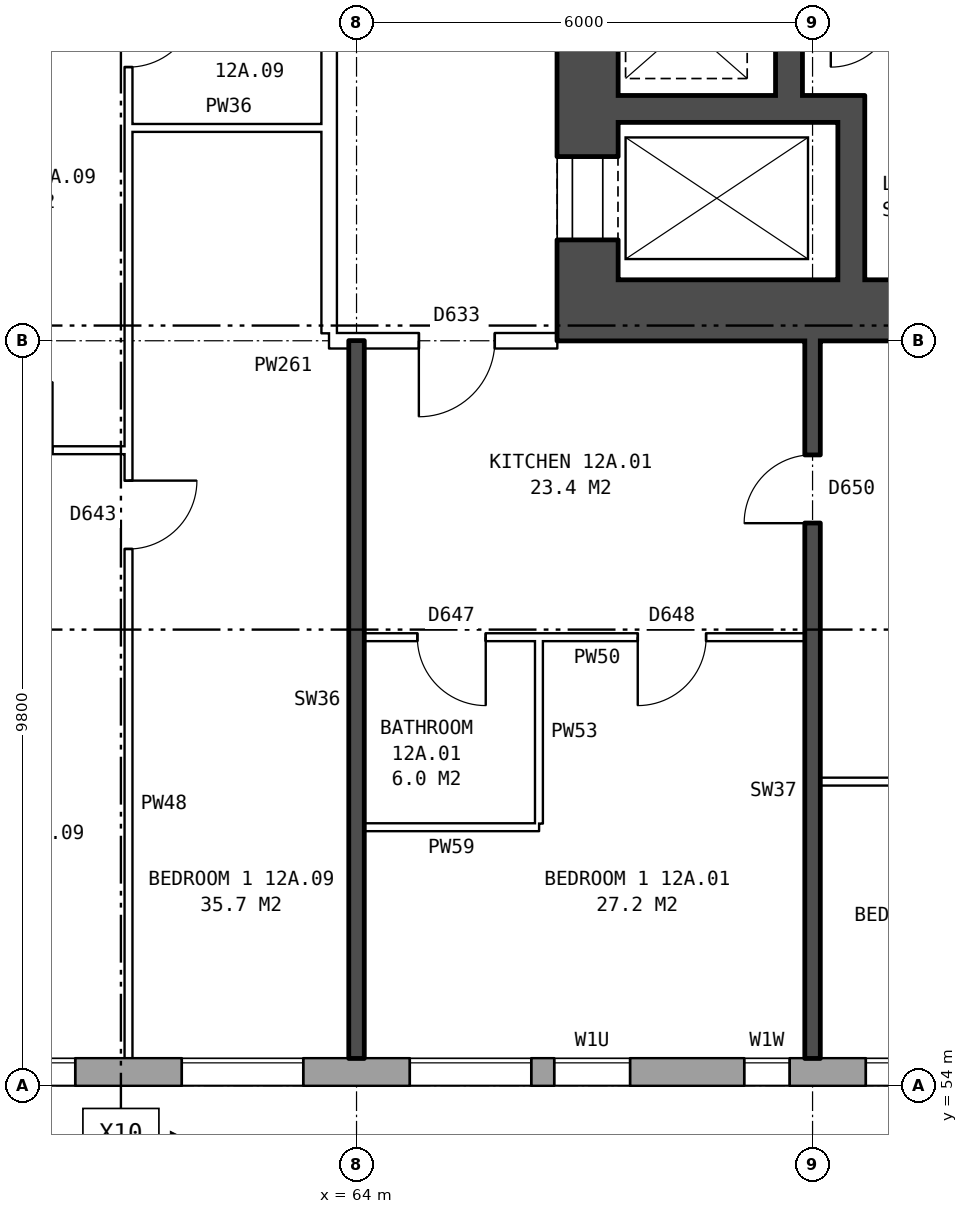
"""IFC4 building model, lengths in metres.
Left out: names, types, materials, properties, quantities, classifications, styles, units other than length and angle.
Written with IfcOpenShell. Run it as: python <this file> out.ifc"""

import sys

from ifc_helpers import new_model, si_unit, direction, frame, frame_2d, origin, place, context, subcontext, project, spatial, rectangle, extrude, element, fill, save


model = new_model("IFC4")
c1 = context("Model", 3, precision=1e-05, world=origin(), true_north=direction((0.0, 1.0)))
c2 = subcontext(c1, "Body", "Model", "MODEL_VIEW")
j1 = project(units=[si_unit("LENGTHUNIT", "METRE"), si_unit("PLANEANGLEUNIT", "RADIAN")], contexts=[c1])
p1 = place(None, origin())
s1 = spatial("IfcSite", under=j1, at=p1, CompositionType="ELEMENT")
p2 = place(p1, origin())
s2 = spatial("IfcBuilding", under=s1, at=p2, CompositionType="ELEMENT")
p3 = place(p2, frame((0.0, 0.0, 47.4)))
s3 = spatial("IfcBuildingStorey", under=s2, at=p3, CompositionType="ELEMENT", Elevation=47.4)
p4 = place(p3, frame((24.575, 54.18, 0.0), z_axis=(0.0, 0.0, 1.0), x_axis=(1.0, 0.0, 0.0)))
e1 = element("IfcWall", 1, at=p4, inside=s3, PredefinedType="STANDARD", context=c2, shape_type="SweptSolid", body=[
    extrude(rectangle(XDim=48.351, YDim=0.36, at=frame_2d((24.175, 0.0))), origin(), (0.0, 0.0, 1.0), 2.85),
])
p5 = place(p4, frame((1.125, 0.0, 0.8)))
e2 = element("IfcOpeningElement", 2, at=p5, cuts=e1, PredefinedType="OPENING", context=c2, shape_type="SweptSolid", body=[
    extrude(rectangle(XDim=1.6, YDim=1.8, at=frame_2d((0.8, 0.9))), frame((0.0, 0.19, 0.0), z_axis=(0.0, -1.0, 0.0), x_axis=(1.0, 0.0, 0.0)), (0.0, 0.0, 1.0), 0.38),
])
p6 = place(p4, frame((5.625, 0.0, 0.8)))
e3 = element("IfcOpeningElement", 3, at=p6, cuts=e1, PredefinedType="OPENING", context=c2, shape_type="SweptSolid", body=[
    extrude(rectangle(XDim=1.2, YDim=1.2, at=frame_2d((0.6, 0.6))), frame((0.0, 0.19, 0.0), z_axis=(0.0, -1.0, 0.0), x_axis=(1.0, 0.0, 0.0)), (0.0, 0.0, 1.0), 0.38),
])
p7 = place(p4, frame((7.125, 0.0, 0.8)))
e4 = element("IfcOpeningElement", 4, at=p7, cuts=e1, PredefinedType="OPENING", context=c2, shape_type="SweptSolid", body=[
    extrude(rectangle(XDim=1.6, YDim=1.8, at=frame_2d((0.8, 0.9))), frame((0.0, 0.19, 0.0), z_axis=(0.0, -1.0, 0.0), x_axis=(1.0, 0.0, 0.0)), (0.0, 0.0, 1.0), 0.38),
])
p8 = place(p4, frame((10.125, 0.0, 0.8)))
e5 = element("IfcOpeningElement", 5, at=p8, cuts=e1, PredefinedType="OPENING", context=c2, shape_type="SweptSolid", body=[
    extrude(rectangle(XDim=1.6, YDim=1.8, at=frame_2d((0.8, 0.9))), frame((0.0, 0.19, 0.0), z_axis=(0.0, -1.0, 0.0), x_axis=(1.0, 0.0, 0.0)), (0.0, 0.0, 1.0), 0.38),
])
p9 = place(p4, frame((13.125, 0.0, 0.8)))
e6 = element("IfcOpeningElement", 6, at=p9, cuts=e1, PredefinedType="OPENING", context=c2, shape_type="SweptSolid", body=[
    extrude(rectangle(XDim=1.6, YDim=1.8, at=frame_2d((0.8, 0.9))), frame((0.0, 0.19, 0.0), z_axis=(0.0, -1.0, 0.0), x_axis=(1.0, 0.0, 0.0)), (0.0, 0.0, 1.0), 0.38),
])
p10 = place(p4, frame((16.125, 0.0, 0.8)))
e7 = element("IfcOpeningElement", 7, at=p10, cuts=e1, PredefinedType="OPENING", context=c2, shape_type="SweptSolid", body=[
    extrude(rectangle(XDim=1.6, YDim=1.8, at=frame_2d((0.8, 0.9))), frame((0.0, 0.19, 0.0), z_axis=(0.0, -1.0, 0.0), x_axis=(1.0, 0.0, 0.0)), (0.0, 0.0, 1.0), 0.38),
])
p11 = place(p4, frame((19.125, 0.0, 0.8)))
e8 = element("IfcOpeningElement", 8, at=p11, cuts=e1, PredefinedType="OPENING", context=c2, shape_type="SweptSolid", body=[
    extrude(rectangle(XDim=1.6, YDim=1.8, at=frame_2d((0.8, 0.9))), frame((0.0, 0.19, 0.0), z_axis=(0.0, -1.0, 0.0), x_axis=(1.0, 0.0, 0.0)), (0.0, 0.0, 1.0), 0.38),
])
p12 = place(p4, frame((22.125, 0.0, 0.8)))
e9 = element("IfcOpeningElement", 9, at=p12, cuts=e1, PredefinedType="OPENING", context=c2, shape_type="SweptSolid", body=[
    extrude(rectangle(XDim=1.6, YDim=1.8, at=frame_2d((0.8, 0.9))), frame((0.0, 0.19, 0.0), z_axis=(0.0, -1.0, 0.0), x_axis=(1.0, 0.0, 0.0)), (0.0, 0.0, 1.0), 0.38),
])
p13 = place(p4, frame((25.125, 0.0, 0.8)))
e10 = element("IfcOpeningElement", 10, at=p13, cuts=e1, PredefinedType="OPENING", context=c2, shape_type="SweptSolid", body=[
    extrude(rectangle(XDim=1.6, YDim=1.8, at=frame_2d((0.8, 0.9))), frame((0.0, 0.19, 0.0), z_axis=(0.0, -1.0, 0.0), x_axis=(1.0, 0.0, 0.0)), (0.0, 0.0, 1.0), 0.38),
])
p14 = place(p4, frame((28.125, 0.0, 0.8)))
e11 = element("IfcOpeningElement", 11, at=p14, cuts=e1, PredefinedType="OPENING", context=c2, shape_type="SweptSolid", body=[
    extrude(rectangle(XDim=1.6, YDim=1.8, at=frame_2d((0.8, 0.9))), frame((0.0, 0.19, 0.0), z_axis=(0.0, -1.0, 0.0), x_axis=(1.0, 0.0, 0.0)), (0.0, 0.0, 1.0), 0.38),
])
p15 = place(p4, frame((31.125, 0.0, 0.8)))
e12 = element("IfcOpeningElement", 12, at=p15, cuts=e1, PredefinedType="OPENING", context=c2, shape_type="SweptSolid", body=[
    extrude(rectangle(XDim=1.6, YDim=1.8, at=frame_2d((0.8, 0.9))), frame((0.0, 0.19, 0.0), z_axis=(0.0, -1.0, 0.0), x_axis=(1.0, 0.0, 0.0)), (0.0, 0.0, 1.0), 0.38),
])
p16 = place(p4, frame((34.125, 0.0, 0.8)))
e13 = element("IfcOpeningElement", 13, at=p16, cuts=e1, PredefinedType="OPENING", context=c2, shape_type="SweptSolid", body=[
    extrude(rectangle(XDim=1.6, YDim=1.8, at=frame_2d((0.8, 0.9))), frame((0.0, 0.19, 0.0), z_axis=(0.0, -1.0, 0.0), x_axis=(1.0, 0.0, 0.0)), (0.0, 0.0, 1.0), 0.38),
])
p17 = place(p4, frame((37.125, 0.0, 0.8)))
e14 = element("IfcOpeningElement", 14, at=p17, cuts=e1, PredefinedType="OPENING", context=c2, shape_type="SweptSolid", body=[
    extrude(rectangle(XDim=1.6, YDim=1.8, at=frame_2d((0.8, 0.9))), frame((0.0, 0.19, 0.0), z_axis=(0.0, -1.0, 0.0), x_axis=(1.0, 0.0, 0.0)), (0.0, 0.0, 1.0), 0.38),
])
p18 = place(p4, frame((40.125, 0.0, 0.8)))
e15 = element("IfcOpeningElement", 15, at=p18, cuts=e1, PredefinedType="OPENING", context=c2, shape_type="SweptSolid", body=[
    extrude(rectangle(XDim=1.6, YDim=1.8, at=frame_2d((0.8, 0.9))), frame((0.0, 0.19, 0.0), z_axis=(0.0, -1.0, 0.0), x_axis=(1.0, 0.0, 0.0)), (0.0, 0.0, 1.0), 0.38),
])
p19 = place(p4, frame((42.025, 0.0, 0.8)))
e16 = element("IfcOpeningElement", 16, at=p19, cuts=e1, PredefinedType="OPENING", context=c2, shape_type="SweptSolid", body=[
    extrude(rectangle(XDim=1.0, YDim=0.9, at=frame_2d((0.5, 0.45))), frame((0.0, 0.19, 0.0), z_axis=(0.0, -1.0, 0.0), x_axis=(1.0, 0.0, 0.0)), (0.0, 0.0, 1.0), 0.38),
])
p20 = place(p4, frame((46.125, 0.0, 0.8)))
e17 = element("IfcOpeningElement", 17, at=p20, cuts=e1, PredefinedType="OPENING", context=c2, shape_type="SweptSolid", body=[
    extrude(rectangle(XDim=1.6, YDim=1.8, at=frame_2d((0.8, 0.9))), frame((0.0, 0.19, 0.0), z_axis=(0.0, -1.0, 0.0), x_axis=(1.0, 0.0, 0.0)), (0.0, 0.0, 1.0), 0.38),
])
p21 = place(p4, frame((44.525, 0.0, 1.7)))
e18 = element("IfcOpeningElement", 18, at=p21, cuts=e1, PredefinedType="OPENING", context=c2, shape_type="SweptSolid", body=[
    extrude(rectangle(XDim=0.6, YDim=0.9, at=frame_2d((0.3, 0.45))), frame((0.0, 0.19, 0.0), z_axis=(0.0, -1.0, 0.0), x_axis=(1.0, 0.0, 0.0)), (0.0, 0.0, 1.0), 0.38),
])
p22 = place(p3, frame((67.04, 64.6, 0.0), z_axis=(0.0, 0.0, 1.0), x_axis=(0.0, 1.0, 0.0)))
e19 = element("IfcWall", 19, at=p22, inside=s3, PredefinedType="SHEAR", context=c2, shape_type="SweptSolid", body=[
    extrude(rectangle(XDim=10.8, YDim=0.8, at=frame_2d((5.4, 0.0))), origin(), (0.0, 0.0, 1.0), 2.85),
])
p23 = place(p22, frame((0.525, 0.0, 0.0)))
e20 = element("IfcOpeningElement", 20, at=p23, cuts=e19, PredefinedType="OPENING", context=c2, shape_type="SweptSolid", body=[
    extrude(rectangle(XDim=1.1, YDim=2.1, at=frame_2d((0.55, 1.05))), frame((0.0, 0.41, 0.0), z_axis=(0.0, -1.0, 0.0), x_axis=(1.0, 0.0, 0.0)), (0.0, 0.0, 1.0), 0.82),
])
p24 = place(p22, frame((9.1, 0.0, 0.0)))
e21 = element("IfcOpeningElement", 21, at=p24, cuts=e19, PredefinedType="OPENING", context=c2, shape_type="SweptSolid", body=[
    extrude(rectangle(XDim=1.1, YDim=2.1, at=frame_2d((0.55, 1.05))), frame((0.0, 0.41, 0.0), z_axis=(0.0, -1.0, 0.0), x_axis=(1.0, 0.0, 0.0)), (0.0, 0.0, 1.0), 0.82),
])
p25 = place(p3, frame((66.64, 64.2, 0.0), z_axis=(0.0, 0.0, 1.0), x_axis=(1.0, 0.0, 0.0)))
e22 = element("IfcWall", 22, at=p25, inside=s3, PredefinedType="SHEAR", context=c2, shape_type="SweptSolid", body=[
    extrude(rectangle(XDim=9.0, YDim=0.8, at=frame_2d((4.5, 0.0))), origin(), (0.0, 0.0, 1.0), 2.85),
])
p26 = place(p3, frame((67.44, 66.85, 0.0), z_axis=(0.0, 0.0, 1.0), x_axis=(1.0, 0.0, 0.0)))
e23 = element("IfcWall", 23, at=p26, inside=s3, PredefinedType="SHEAR", context=c2, shape_type="SweptSolid", body=[
    extrude(rectangle(XDim=3.245, YDim=0.35, at=frame_2d((1.623, 0.0))), origin(), (0.0, 0.0, 1.0), 2.85),
])
p27 = place(p3, frame((69.69, 67.025, 0.0), z_axis=(0.0, 0.0, 1.0), x_axis=(0.0, 1.0, 0.0)))
e24 = element("IfcWall", 24, at=p27, inside=s3, PredefinedType="SHEAR", context=c2, shape_type="SweptSolid", body=[
    extrude(rectangle(XDim=6.6, YDim=0.35, at=frame_2d((3.3, 0.0))), origin(), (0.0, 0.0, 1.0), 2.85),
])
p28 = place(p3, frame((70.51, 64.6, 0.0), z_axis=(0.0, 0.0, 1.0), x_axis=(0.0, 1.0, 0.0)))
e25 = element("IfcWall", 25, at=p28, inside=s3, PredefinedType="SHEAR", context=c2, shape_type="SweptSolid", body=[
    extrude(rectangle(XDim=2.075, YDim=0.35, at=frame_2d((1.038, 0.0))), origin(), (0.0, 0.0, 1.0), 2.85),
])
p29 = place(p3, frame((63.64, 63.9, 0.0), z_axis=(0.0, 0.0, 1.0), x_axis=(0.0, 1.0, 0.0)))
e26 = element("IfcWall", 26, at=p29, inside=s3, PredefinedType="PARTITIONING", context=c2, shape_type="SweptSolid", body=[
    extrude(rectangle(XDim=12.2, YDim=0.2, at=frame_2d((6.1, 0.0))), origin(), (0.0, 0.0, 1.0), 2.85),
])
p30 = place(p29, frame((5.1, 0.0, 0.0)))
e27 = element("IfcOpeningElement", 27, at=p30, cuts=e26, PredefinedType="OPENING", context=c2, shape_type="SweptSolid", body=[
    extrude(rectangle(XDim=2.0, YDim=2.1, at=frame_2d((1.0, 1.05))), frame((0.0, 0.11, 0.0), z_axis=(0.0, -1.0, 0.0), x_axis=(1.0, 0.0, 0.0)), (0.0, 0.0, 1.0), 0.22),
])
p31 = place(p3, frame((64.1, 57.4, 0.0), z_axis=(0.0, 0.0, 1.0), x_axis=(1.0, 0.0, 0.0)))
e28 = element("IfcWall", 28, at=p31, inside=s3, PredefinedType="PARTITIONING", context=c2, shape_type="SweptSolid", body=[
    extrude(rectangle(XDim=2.3, YDim=0.1, at=frame_2d((1.15, 0.0))), origin(), (0.0, 0.0, 1.0), 2.85),
])
p32 = place(p3, frame((70.1, 58.0, 0.0), z_axis=(0.0, 0.0, 1.0), x_axis=(1.0, 0.0, 0.0)))
e29 = element("IfcWall", 29, at=p32, inside=s3, PredefinedType="PARTITIONING", context=c2, shape_type="SweptSolid", body=[
    extrude(rectangle(XDim=5.54, YDim=0.1, at=frame_2d((2.77, 0.0))), origin(), (0.0, 0.0, 1.0), 2.85),
])
p33 = place(p32, frame((2.32, 0.0, 0.0)))
e30 = element("IfcOpeningElement", 30, at=p33, cuts=e29, PredefinedType="OPENING", context=c2, shape_type="SweptSolid", body=[
    extrude(rectangle(XDim=0.9, YDim=2.1, at=frame_2d((0.45, 1.05))), frame((0.0, 0.06, 0.0), z_axis=(0.0, -1.0, 0.0), x_axis=(1.0, 0.0, 0.0)), (0.0, 0.0, 1.0), 0.12),
])
p34 = place(p3, frame((64.1, 59.9, 0.0), z_axis=(0.0, 0.0, 1.0), x_axis=(1.0, 0.0, 0.0)))
e31 = element("IfcWall", 31, at=p34, inside=s3, PredefinedType="PARTITIONING", context=c2, shape_type="SweptSolid", body=[
    extrude(rectangle(XDim=5.8, YDim=0.1, at=frame_2d((2.9, 0.0))), origin(), (0.0, 0.0, 1.0), 2.85),
])
p35 = place(p34, frame((3.6, 0.0, 0.0)))
e32 = element("IfcOpeningElement", 32, at=p35, cuts=e31, PredefinedType="OPENING", context=c2, shape_type="SweptSolid", body=[
    extrude(rectangle(XDim=0.9, YDim=2.1, at=frame_2d((0.45, 1.05))), frame((0.0, 0.06, 0.0), z_axis=(0.0, -1.0, 0.0), x_axis=(1.0, 0.0, 0.0)), (0.0, 0.0, 1.0), 0.12),
])
p36 = place(p34, frame((0.7, 0.0, 0.0)))
e33 = element("IfcOpeningElement", 33, at=p36, cuts=e31, PredefinedType="OPENING", context=c2, shape_type="SweptSolid", body=[
    extrude(rectangle(XDim=0.9, YDim=2.1, at=frame_2d((0.45, 1.05))), frame((0.0, 0.06, 0.0), z_axis=(0.0, -1.0, 0.0), x_axis=(1.0, 0.0, 0.0)), (0.0, 0.0, 1.0), 0.12),
])
p37 = place(p3, frame((58.1, 62.36, 0.0), z_axis=(0.0, 0.0, 1.0), x_axis=(1.0, 0.0, 0.0)))
e34 = element("IfcWall", 34, at=p37, inside=s3, PredefinedType="PARTITIONING", context=c2, shape_type="SweptSolid", body=[
    extrude(rectangle(XDim=2.9, YDim=0.1, at=frame_2d((1.45, 0.0))), origin(), (0.0, 0.0, 1.0), 2.85),
])
p38 = place(p37, frame((1.0, 0.0, 0.0)))
e35 = element("IfcOpeningElement", 35, at=p38, cuts=e34, PredefinedType="OPENING", context=c2, shape_type="SweptSolid", body=[
    extrude(rectangle(XDim=0.9, YDim=2.1, at=frame_2d((0.45, 1.05))), frame((0.0, 0.06, 0.0), z_axis=(0.0, -1.0, 0.0), x_axis=(1.0, 0.0, 0.0)), (0.0, 0.0, 1.0), 0.12),
])
p39 = place(p3, frame((63.64, 63.8, 0.0), z_axis=(0.0, 0.0, 1.0), x_axis=(1.0, 0.0, 0.0)))
e36 = element("IfcWall", 36, at=p39, inside=s3, PredefinedType="PARTITIONING", context=c2, shape_type="SweptSolid", body=[
    extrude(rectangle(XDim=3.0, YDim=0.2, at=frame_2d((1.5, 0.0))), origin(), (0.0, 0.0, 1.0), 2.85),
])
p40 = place(p39, frame((1.18, 0.0, 0.0)))
e37 = element("IfcOpeningElement", 37, at=p40, cuts=e36, PredefinedType="OPENING", context=c2, shape_type="SweptSolid", body=[
    extrude(rectangle(XDim=1.0, YDim=2.1, at=frame_2d((0.5, 1.05))), frame((0.0, 0.11, 0.0), z_axis=(0.0, -1.0, 0.0), x_axis=(1.0, 0.0, 0.0)), (0.0, 0.0, 1.0), 0.22),
])
p41 = place(p3, frame((61.0, 66.6, 0.0), z_axis=(0.0, 0.0, 1.0), x_axis=(1.0, 0.0, 0.0)))
e38 = element("IfcWall", 38, at=p41, inside=s3, PredefinedType="PARTITIONING", context=c2, shape_type="SweptSolid", body=[
    extrude(rectangle(XDim=2.64, YDim=0.1, at=frame_2d((1.32, 0.0))), origin(), (0.0, 0.0, 1.0), 2.85),
])
p42 = place(p3, frame((61.0, 54.36, 0.0), z_axis=(0.0, 0.0, 1.0), x_axis=(0.0, 1.0, 0.0)))
e39 = element("IfcWall", 39, at=p42, inside=s3, PredefinedType="PARTITIONING", context=c2, shape_type="SweptSolid", body=[
    extrude(rectangle(XDim=14.34, YDim=0.1, at=frame_2d((7.17, 0.0))), origin(), (0.0, 0.0, 1.0), 2.85),
])
p43 = place(p42, frame((6.7, 0.0, 0.0)))
e40 = element("IfcOpeningElement", 40, at=p43, cuts=e39, PredefinedType="OPENING", context=c2, shape_type="SweptSolid", body=[
    extrude(rectangle(XDim=0.9, YDim=2.1, at=frame_2d((0.45, 1.05))), frame((0.0, 0.06, 0.0), z_axis=(0.0, -1.0, 0.0), x_axis=(1.0, 0.0, 0.0)), (0.0, 0.0, 1.0), 0.12),
])
p44 = place(p42, frame((13.04, 0.0, 0.0)))
e41 = element("IfcOpeningElement", 41, at=p44, cuts=e39, PredefinedType="OPENING", context=c2, shape_type="SweptSolid", body=[
    extrude(rectangle(XDim=0.9, YDim=2.1, at=frame_2d((0.45, 1.05))), frame((0.0, 0.06, 0.0), z_axis=(0.0, -1.0, 0.0), x_axis=(1.0, 0.0, 0.0)), (0.0, 0.0, 1.0), 0.12),
])
p45 = place(p3, frame((64.0, 54.36, 0.0), z_axis=(0.0, 0.0, 1.0), x_axis=(0.0, 1.0, 0.0)))
e42 = element("IfcWall", 42, at=p45, inside=s3, PredefinedType="SOLIDWALL", context=c2, shape_type="SweptSolid", body=[
    extrude(rectangle(XDim=9.44, YDim=0.2, at=frame_2d((4.72, 0.0))), origin(), (0.0, 0.0, 1.0), 2.85),
])
p46 = place(p3, frame((66.4, 57.45, 0.0), z_axis=(0.0, 0.0, 1.0), x_axis=(0.0, 1.0, 0.0)))
e43 = element("IfcWall", 43, at=p46, inside=s3, PredefinedType="PARTITIONING", context=c2, shape_type="SweptSolid", body=[
    extrude(rectangle(XDim=2.4, YDim=0.1, at=frame_2d((1.2, 0.0))), origin(), (0.0, 0.0, 1.0), 2.85),
])
p47 = place(p3, frame((70.0, 54.36, 0.0), z_axis=(0.0, 0.0, 1.0), x_axis=(0.0, 1.0, 0.0)))
e44 = element("IfcWall", 44, at=p47, inside=s3, PredefinedType="SOLIDWALL", context=c2, shape_type="SweptSolid", body=[
    extrude(rectangle(XDim=9.44, YDim=0.2, at=frame_2d((4.72, 0.0))), origin(), (0.0, 0.0, 1.0), 2.85),
])
p48 = place(p47, frame((7.04, 0.0, 0.0)))
e45 = element("IfcOpeningElement", 45, at=p48, cuts=e44, PredefinedType="OPENING", context=c2, shape_type="SweptSolid", body=[
    extrude(rectangle(XDim=0.9, YDim=2.1, at=frame_2d((0.45, 1.05))), frame((0.0, 0.11, 0.0), z_axis=(0.0, -1.0, 0.0), x_axis=(1.0, 0.0, 0.0)), (0.0, 0.0, 1.0), 0.22),
])
p49 = place(p16, origin())
e46 = element("IfcWindow", 46, at=p49, inside=s3, PartitioningType="SINGLE_PANEL", PredefinedType="WINDOW", context=c2, shape_type="SweptSolid", body=[
    extrude(rectangle(XDim=1.6, YDim=1.8, at=frame_2d((0.8, 0.9))), frame((0.0, 0.15, 0.0), z_axis=(0.0, -1.0, 0.0), x_axis=(1.0, 0.0, 0.0)), (0.0, 0.0, 1.0), 0.06),
])
fill(e13, e46)
p50 = place(p17, origin())
e47 = element("IfcWindow", 47, at=p50, inside=s3, PartitioningType="SINGLE_PANEL", PredefinedType="WINDOW", context=c2, shape_type="SweptSolid", body=[
    extrude(rectangle(XDim=1.6, YDim=1.8, at=frame_2d((0.8, 0.9))), frame((0.0, 0.15, 0.0), z_axis=(0.0, -1.0, 0.0), x_axis=(1.0, 0.0, 0.0)), (0.0, 0.0, 1.0), 0.06),
])
fill(e14, e47)
p51 = place(p18, origin())
e48 = element("IfcWindow", 48, at=p51, inside=s3, PartitioningType="SINGLE_PANEL", PredefinedType="WINDOW", context=c2, shape_type="SweptSolid", body=[
    extrude(rectangle(XDim=1.6, YDim=1.8, at=frame_2d((0.8, 0.9))), frame((0.0, 0.15, 0.0), z_axis=(0.0, -1.0, 0.0), x_axis=(1.0, 0.0, 0.0)), (0.0, 0.0, 1.0), 0.06),
])
fill(e15, e48)
p52 = place(p19, origin())
e49 = element("IfcWindow", 49, at=p52, inside=s3, PartitioningType="SINGLE_PANEL", PredefinedType="WINDOW", context=c2, shape_type="SweptSolid", body=[
    extrude(rectangle(XDim=1.0, YDim=0.9, at=frame_2d((0.5, 0.45))), frame((0.0, 0.15, 0.0), z_axis=(0.0, -1.0, 0.0), x_axis=(1.0, 0.0, 0.0)), (0.0, 0.0, 1.0), 0.06),
])
fill(e16, e49)
p53 = place(p20, origin())
e50 = element("IfcWindow", 50, at=p53, inside=s3, PartitioningType="SINGLE_PANEL", PredefinedType="WINDOW", context=c2, shape_type="SweptSolid", body=[
    extrude(rectangle(XDim=1.6, YDim=1.8, at=frame_2d((0.8, 0.9))), frame((0.0, 0.15, 0.0), z_axis=(0.0, -1.0, 0.0), x_axis=(1.0, 0.0, 0.0)), (0.0, 0.0, 1.0), 0.06),
])
fill(e17, e50)
p54 = place(p23, origin())
e51 = element("IfcDoor", 51, at=p54, inside=s3, OperationType="DOUBLE_DOOR_SLIDING", PredefinedType="DOOR", context=c2, shape_type="SweptSolid", body=[
    extrude(rectangle(XDim=1.1, YDim=2.1, at=frame_2d((0.55, 1.05))), frame((0.0, -0.335, 0.0), z_axis=(0.0, -1.0, 0.0), x_axis=(1.0, 0.0, 0.0)), (0.0, 0.0, 1.0), 0.05),
])
fill(e20, e51)
p55 = place(p35, frame((0.9, 0.0, 0.0), z_axis=(0.0, 0.0, 1.0), x_axis=(-1.0, 0.0, 0.0)))
e52 = element("IfcDoor", 52, at=p55, inside=s3, OperationType="SINGLE_SWING_RIGHT", PredefinedType="DOOR", context=c2, shape_type="SweptSolid", body=[
    extrude(rectangle(XDim=0.9, YDim=2.1, at=frame_2d((0.45, 1.05))), frame((0.0, 0.025, 0.0), z_axis=(0.0, -1.0, 0.0), x_axis=(1.0, 0.0, 0.0)), (0.0, 0.0, 1.0), 0.05),
])
fill(e32, e52)
p56 = place(p40, frame((1.0, 0.0, 0.0), z_axis=(0.0, 0.0, 1.0), x_axis=(-1.0, 0.0, 0.0)))
e53 = element("IfcDoor", 53, at=p56, inside=s3, OperationType="SINGLE_SWING_RIGHT", PredefinedType="DOOR", context=c2, shape_type="SweptSolid", body=[
    extrude(rectangle(XDim=1.0, YDim=2.1, at=frame_2d((0.5, 1.05))), frame((0.0, 0.025, 0.0), z_axis=(0.0, -1.0, 0.0), x_axis=(1.0, 0.0, 0.0)), (0.0, 0.0, 1.0), 0.05),
])
fill(e37, e53)
p57 = place(p48, origin())
e54 = element("IfcDoor", 54, at=p57, inside=s3, OperationType="SINGLE_SWING_LEFT", PredefinedType="DOOR", context=c2, shape_type="SweptSolid", body=[
    extrude(rectangle(XDim=0.9, YDim=2.1, at=frame_2d((0.45, 1.05))), frame((0.0, 0.025, 0.0), z_axis=(0.0, -1.0, 0.0), x_axis=(1.0, 0.0, 0.0)), (0.0, 0.0, 1.0), 0.05),
])
fill(e45, e54)
p58 = place(p36, frame((0.9, 0.0, 0.0), z_axis=(0.0, 0.0, 1.0), x_axis=(-1.0, 0.0, 0.0)))
e55 = element("IfcDoor", 55, at=p58, inside=s3, OperationType="SINGLE_SWING_LEFT", PredefinedType="DOOR", context=c2, shape_type="SweptSolid", body=[
    extrude(rectangle(XDim=0.9, YDim=2.1, at=frame_2d((0.45, 1.05))), frame((0.0, 0.025, 0.0), z_axis=(0.0, -1.0, 0.0), x_axis=(1.0, 0.0, 0.0)), (0.0, 0.0, 1.0), 0.05),
])
fill(e33, e55)
p59 = place(p43, frame((0.9, 0.0, 0.0), z_axis=(0.0, 0.0, 1.0), x_axis=(-1.0, 0.0, 0.0)))
e56 = element("IfcDoor", 56, at=p59, inside=s3, OperationType="SINGLE_SWING_LEFT", PredefinedType="DOOR", context=c2, shape_type="SweptSolid", body=[
    extrude(rectangle(XDim=0.9, YDim=2.1, at=frame_2d((0.45, 1.05))), frame((0.0, 0.025, 0.0), z_axis=(0.0, -1.0, 0.0), x_axis=(1.0, 0.0, 0.0)), (0.0, 0.0, 1.0), 0.05),
])
fill(e40, e56)
p60 = place(p44, frame((0.9, 0.0, 0.0), z_axis=(0.0, 0.0, 1.0), x_axis=(-1.0, 0.0, 0.0)))
e57 = element("IfcDoor", 57, at=p60, inside=s3, OperationType="SINGLE_SWING_LEFT", PredefinedType="DOOR", context=c2, shape_type="SweptSolid", body=[
    extrude(rectangle(XDim=0.9, YDim=2.1, at=frame_2d((0.45, 1.05))), frame((0.0, 0.025, 0.0), z_axis=(0.0, -1.0, 0.0), x_axis=(1.0, 0.0, 0.0)), (0.0, 0.0, 1.0), 0.05),
])
fill(e41, e57)
p61 = place(p21, origin())
e58 = element("IfcWindow", 58, at=p61, inside=s3, PartitioningType="SINGLE_PANEL", PredefinedType="WINDOW", context=c2, shape_type="SweptSolid", body=[
    extrude(rectangle(XDim=0.6, YDim=0.9, at=frame_2d((0.3, 0.45))), frame((0.0, 0.15, 0.0), z_axis=(0.0, -1.0, 0.0), x_axis=(1.0, 0.0, 0.0)), (0.0, 0.0, 1.0), 0.06),
])
fill(e18, e58)
save(model, sys.argv[1])
